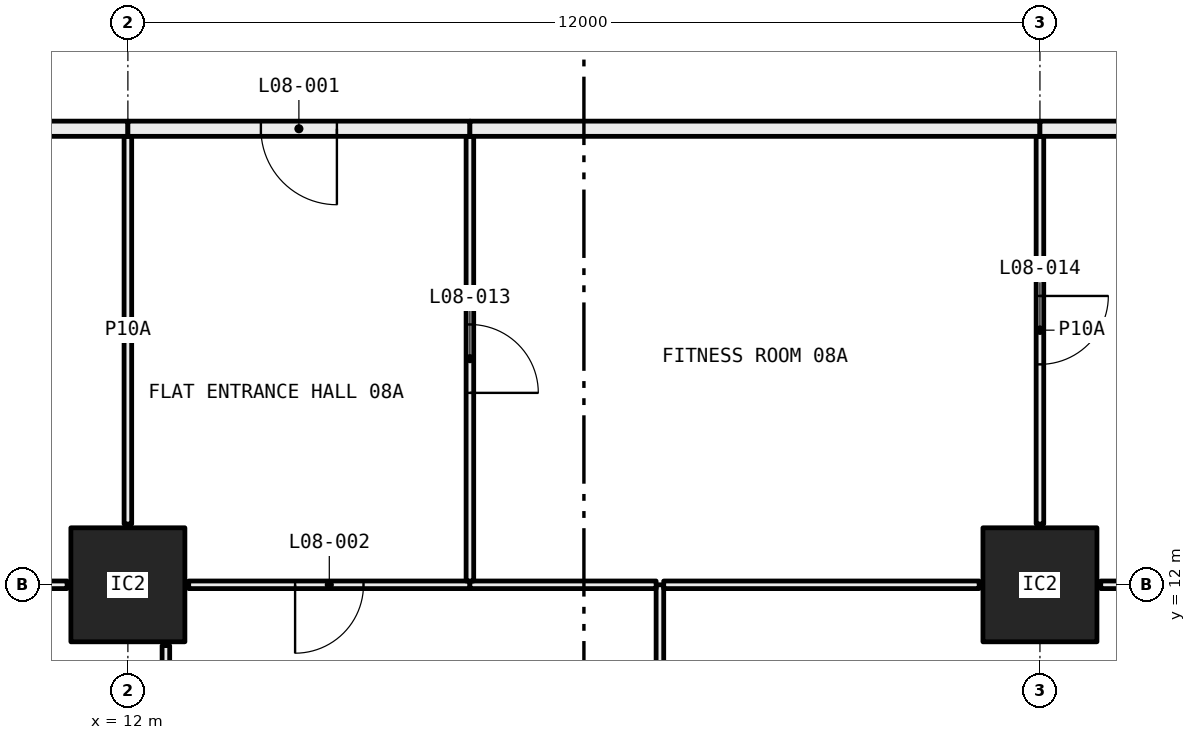
"""IFC4 building model, lengths in metres.
Left out: names, types, materials, properties, quantities, classifications, styles, units other than length and angle.
Written with IfcOpenShell. Run it as: python <this file> out.ifc"""

import sys

from ifc_helpers import new_model, si_unit, direction, frame, frame_2d, origin, origin_2d, place, context, subcontext, project, spatial, rectangle, hollow_rectangle, extrude, element, fill, save


model = new_model("IFC4")
c1 = context("Model", 3, precision=1e-05, world=origin(), true_north=direction((0.0, 1.0)))
c2 = subcontext(c1, "Body", "Model", "MODEL_VIEW")
j1 = project(units=[si_unit("LENGTHUNIT", "METRE"), si_unit("PLANEANGLEUNIT", "RADIAN")], contexts=[c1])
p1 = place(None, origin())
s1 = spatial("IfcSite", under=j1, at=p1, CompositionType="ELEMENT")
p2 = place(p1, origin())
s2 = spatial("IfcBuilding", under=s1, at=p2, CompositionType="ELEMENT")
p3 = place(p2, frame((0.0, 0.0, 40.35)))
s3 = spatial("IfcBuildingStorey", under=s2, at=p3, CompositionType="ELEMENT", Elevation=40.35)
for number, where, z_axis, x_axis in (
    (1, (12.0, 12.0, 0.0), (0.0, 0.0, 1.0), (1.0, 0.0, 0.0)),
    (2, (24.0, 12.0, 0.0), (0.0, 0.0, 1.0), (1.0, 0.0, 0.0)),
):
    element("IfcColumn", number, at=place(p3, frame(where, z_axis=z_axis, x_axis=x_axis)), inside=s3, PredefinedType="COLUMN", context=c2, shape_type="SweptSolid", body=[
        extrude(hollow_rectangle(XDim=1.5, YDim=1.5, WallThickness=0.065, at=origin_2d()), origin(), (0.0, 0.0, 1.0), 3.05),
    ])
p4 = place(p3, frame((12.5, 6.05, 0.0), z_axis=(0.0, 0.0, 1.0), x_axis=(0.0, 1.0, 0.0)))
e3 = element("IfcWall", 3, at=p4, inside=s3, PredefinedType="PARTITIONING", context=c2, shape_type="SweptSolid", body=[
    extrude(rectangle(XDim=5.15, YDim=0.1, at=frame_2d((2.575, 0.0))), origin(), (0.0, 0.0, 1.0), 3.05),
])
p5 = place(p4, frame((2.125, 0.0, 0.0)))
e4 = element("IfcOpeningElement", 4, at=p5, cuts=e3, PredefinedType="OPENING", context=c2, shape_type="SweptSolid", body=[
    extrude(rectangle(XDim=0.9, YDim=2.1, at=frame_2d((0.45, 1.05))), frame((0.0, 0.06, 0.0), z_axis=(0.0, -1.0, 0.0), x_axis=(1.0, 0.0, 0.0)), (0.0, 0.0, 1.0), 0.12),
])
p6 = place(p3, frame((11.2, 12.0, 0.0), z_axis=(0.0, 0.0, 1.0), x_axis=(-1.0, 0.0, 0.0)))
e5 = element("IfcWall", 5, at=p6, inside=s3, PredefinedType="PARTITIONING", context=c2, shape_type="SweptSolid", body=[
    extrude(rectangle(XDim=5.15, YDim=0.1, at=frame_2d((2.575, 0.0))), origin(), (0.0, 0.0, 1.0), 2.45),
])
p7 = place(p6, frame((2.125, 0.0, 0.0)))
e6 = element("IfcOpeningElement", 6, at=p7, cuts=e5, PredefinedType="OPENING", context=c2, shape_type="SweptSolid", body=[
    extrude(rectangle(XDim=0.9, YDim=2.1, at=frame_2d((0.45, 1.05))), frame((0.0, 0.06, 0.0), z_axis=(0.0, -1.0, 0.0), x_axis=(1.0, 0.0, 0.0)), (0.0, 0.0, 1.0), 0.12),
])
p8 = place(p3, frame((19.0, 6.05, 0.0), z_axis=(0.0, 0.0, 1.0), x_axis=(0.0, 1.0, 0.0)))
e7 = element("IfcWall", 7, at=p8, inside=s3, PredefinedType="PARTITIONING", context=c2, shape_type="SweptSolid", body=[
    extrude(rectangle(XDim=5.95, YDim=0.1, at=frame_2d((2.975, 0.0))), origin(), (0.0, 0.0, 1.0), 2.45),
])
p9 = place(p8, frame((2.525, 0.0, 0.0)))
e8 = element("IfcOpeningElement", 8, at=p9, cuts=e7, PredefinedType="OPENING", context=c2, shape_type="SweptSolid", body=[
    extrude(rectangle(XDim=0.9, YDim=2.1, at=frame_2d((0.45, 1.05))), frame((0.0, 0.06, 0.0), z_axis=(0.0, -1.0, 0.0), x_axis=(1.0, 0.0, 0.0)), (0.0, 0.0, 1.0), 0.12),
])
p10 = place(p3, frame((16.5, 12.0, 0.0), z_axis=(0.0, 0.0, 1.0), x_axis=(-1.0, 0.0, 0.0)))
e9 = element("IfcWall", 9, at=p10, inside=s3, PredefinedType="PARTITIONING", context=c2, shape_type="SweptSolid", body=[
    extrude(rectangle(XDim=3.7, YDim=0.1, at=frame_2d((1.85, 0.0))), origin(), (0.0, 0.0, 1.0), 2.45),
])
p11 = place(p10, frame((1.4, 0.0, 0.0)))
e10 = element("IfcOpeningElement", 10, at=p11, cuts=e9, PredefinedType="OPENING", context=c2, shape_type="SweptSolid", body=[
    extrude(rectangle(XDim=0.9, YDim=2.1, at=frame_2d((0.45, 1.05))), frame((0.0, 0.06, 0.0), z_axis=(0.0, -1.0, 0.0), x_axis=(1.0, 0.0, 0.0)), (0.0, 0.0, 1.0), 0.12),
])
p12 = place(p3, frame((18.95, 12.0, 0.0), z_axis=(0.0, 0.0, 1.0), x_axis=(-1.0, 0.0, 0.0)))
e11 = element("IfcWall", 11, at=p12, inside=s3, PredefinedType="PARTITIONING", context=c2, shape_type="SweptSolid", body=[
    extrude(rectangle(XDim=2.45, YDim=0.1, at=frame_2d((1.225, 0.0))), origin(), (0.0, 0.0, 1.0), 2.45),
])
p13 = place(p3, frame((23.2, 12.0, 0.0), z_axis=(0.0, 0.0, 1.0), x_axis=(-1.0, 0.0, 0.0)))
e12 = element("IfcWall", 12, at=p13, inside=s3, PredefinedType="PARTITIONING", context=c2, shape_type="SweptSolid", body=[
    extrude(rectangle(XDim=4.15, YDim=0.1, at=frame_2d((2.075, 0.0))), origin(), (0.0, 0.0, 1.0), 2.45),
])
p14 = place(p3, frame((25.425, 12.0, 0.0), z_axis=(0.0, 0.0, 1.0), x_axis=(-1.0, 0.0, 0.0)))
e13 = element("IfcWall", 13, at=p14, inside=s3, PredefinedType="PARTITIONING", context=c2, shape_type="SweptSolid", body=[
    extrude(rectangle(XDim=0.625, YDim=0.1, at=frame_2d((0.312, 0.0))), origin(), (0.0, 0.0, 1.0), 2.45),
])
p15 = place(p3, frame((12.0, 12.8, 0.0), z_axis=(0.0, 0.0, 1.0), x_axis=(0.0, 1.0, 0.0)))
e14 = element("IfcWall", 14, at=p15, inside=s3, PredefinedType="PARTITIONING", context=c2, shape_type="SweptSolid", body=[
    extrude(rectangle(XDim=5.1, YDim=0.1, at=frame_2d((2.55, 0.0))), origin(), (0.0, 0.0, 1.0), 3.05),
])
p16 = place(p3, frame((12.0, 18.0, 0.0), z_axis=(0.0, 0.0, 1.0), x_axis=(-1.0, 0.0, 0.0)))
e15 = element("IfcWall", 15, at=p16, inside=s3, PredefinedType="PARTITIONING", context=c2, shape_type="SweptSolid", body=[
    extrude(rectangle(XDim=1.9, YDim=0.2, at=frame_2d((0.95, 0.0))), origin(), (0.0, 0.0, 1.0), 3.05),
])
p17 = place(p3, frame((16.5, 12.05, 0.0), z_axis=(0.0, 0.0, 1.0), x_axis=(0.0, 1.0, 0.0)))
e16 = element("IfcWall", 16, at=p17, inside=s3, PredefinedType="PARTITIONING", context=c2, shape_type="SweptSolid", body=[
    extrude(rectangle(XDim=5.85, YDim=0.1, at=frame_2d((2.925, 0.0))), origin(), (0.0, 0.0, 1.0), 2.45),
])
p18 = place(p17, frame((2.475, 0.0, 0.0)))
e17 = element("IfcOpeningElement", 17, at=p18, cuts=e16, PredefinedType="OPENING", context=c2, shape_type="SweptSolid", body=[
    extrude(rectangle(XDim=0.9, YDim=2.1, at=frame_2d((0.45, 1.05))), frame((0.0, 0.06, 0.0), z_axis=(0.0, -1.0, 0.0), x_axis=(1.0, 0.0, 0.0)), (0.0, 0.0, 1.0), 0.12),
])
p19 = place(p3, frame((16.5, 18.0, 0.0), z_axis=(0.0, 0.0, 1.0), x_axis=(-1.0, 0.0, 0.0)))
e18 = element("IfcWall", 18, at=p19, inside=s3, PredefinedType="PARTITIONING", context=c2, shape_type="SweptSolid", body=[
    extrude(rectangle(XDim=4.5, YDim=0.2, at=frame_2d((2.25, 0.0))), origin(), (0.0, 0.0, 1.0), 3.05),
])
p20 = place(p19, frame((1.75, 0.0, 0.0)))
e19 = element("IfcOpeningElement", 19, at=p20, cuts=e18, PredefinedType="OPENING", context=c2, shape_type="SweptSolid", body=[
    extrude(rectangle(XDim=1.0, YDim=2.1, at=frame_2d((0.5, 1.05))), frame((0.0, 0.11, 0.0), z_axis=(0.0, -1.0, 0.0), x_axis=(1.0, 0.0, 0.0)), (0.0, 0.0, 1.0), 0.22),
])
p21 = place(p3, frame((24.0, 12.8, 0.0), z_axis=(0.0, 0.0, 1.0), x_axis=(0.0, 1.0, 0.0)))
e20 = element("IfcWall", 20, at=p21, inside=s3, PredefinedType="PARTITIONING", context=c2, shape_type="SweptSolid", body=[
    extrude(rectangle(XDim=5.1, YDim=0.1, at=frame_2d((2.55, 0.0))), origin(), (0.0, 0.0, 1.0), 3.05),
])
p22 = place(p21, frame((2.1, 0.0, 0.0)))
e21 = element("IfcOpeningElement", 21, at=p22, cuts=e20, PredefinedType="OPENING", context=c2, shape_type="SweptSolid", body=[
    extrude(rectangle(XDim=0.9, YDim=2.1, at=frame_2d((0.45, 1.05))), frame((0.0, 0.06, 0.0), z_axis=(0.0, -1.0, 0.0), x_axis=(1.0, 0.0, 0.0)), (0.0, 0.0, 1.0), 0.12),
])
p23 = place(p3, frame((24.0, 18.0, 0.0), z_axis=(0.0, 0.0, 1.0), x_axis=(-1.0, 0.0, 0.0)))
e22 = element("IfcWall", 22, at=p23, inside=s3, PredefinedType="PARTITIONING", context=c2, shape_type="SweptSolid", body=[
    extrude(rectangle(XDim=7.5, YDim=0.2, at=frame_2d((3.75, 0.0))), origin(), (0.0, 0.0, 1.0), 3.05),
])
p24 = place(p3, frame((25.9, 18.0, 0.0), z_axis=(0.0, 0.0, 1.0), x_axis=(-1.0, 0.0, 0.0)))
e23 = element("IfcWall", 23, at=p24, inside=s3, PredefinedType="PARTITIONING", context=c2, shape_type="SweptSolid", body=[
    extrude(rectangle(XDim=1.9, YDim=0.2, at=frame_2d((0.95, 0.0))), origin(), (0.0, 0.0, 1.0), 3.05),
])
p25 = place(p20, origin())
e24 = element("IfcDoor", 24, at=p25, inside=s3, OperationType="SINGLE_SWING_RIGHT", PredefinedType="DOOR", context=c2, shape_type="SweptSolid", body=[
    extrude(rectangle(XDim=1.0, YDim=2.1, at=frame_2d((0.5, 1.05))), frame((0.0, 0.025, 0.0), z_axis=(0.0, -1.0, 0.0), x_axis=(1.0, 0.0, 0.0)), (0.0, 0.0, 1.0), 0.05),
])
fill(e19, e24)
p26 = place(p11, origin())
e25 = element("IfcDoor", 25, at=p26, inside=s3, OperationType="SINGLE_SWING_LEFT", PredefinedType="DOOR", context=c2, shape_type="SweptSolid", body=[
    extrude(rectangle(XDim=0.9, YDim=2.1, at=frame_2d((0.45, 1.05))), frame((0.0, 0.025, 0.0), z_axis=(0.0, -1.0, 0.0), x_axis=(1.0, 0.0, 0.0)), (0.0, 0.0, 1.0), 0.05),
])
fill(e10, e25)
p27 = place(p18, frame((0.9, 0.0, 0.0), x_axis=(-1.0, 0.0, 0.0)))
e26 = element("IfcDoor", 26, at=p27, inside=s3, OperationType="SINGLE_SWING_LEFT", PredefinedType="DOOR", context=c2, shape_type="SweptSolid", body=[
    extrude(rectangle(XDim=0.9, YDim=2.1, at=frame_2d((0.45, 1.05))), frame((0.0, 0.025, 0.0), z_axis=(0.0, -1.0, 0.0), x_axis=(1.0, 0.0, 0.0)), (0.0, 0.0, 1.0), 0.05),
])
fill(e17, e26)
p28 = place(p22, frame((0.9, 0.0, 0.0), x_axis=(-1.0, 0.0, 0.0)))
e27 = element("IfcDoor", 27, at=p28, inside=s3, OperationType="SINGLE_SWING_RIGHT", PredefinedType="DOOR", context=c2, shape_type="SweptSolid", body=[
    extrude(rectangle(XDim=0.9, YDim=2.1, at=frame_2d((0.45, 1.05))), frame((0.0, 0.025, 0.0), z_axis=(0.0, -1.0, 0.0), x_axis=(1.0, 0.0, 0.0)), (0.0, 0.0, 1.0), 0.05),
])
fill(e21, e27)
save(model, sys.argv[1])
